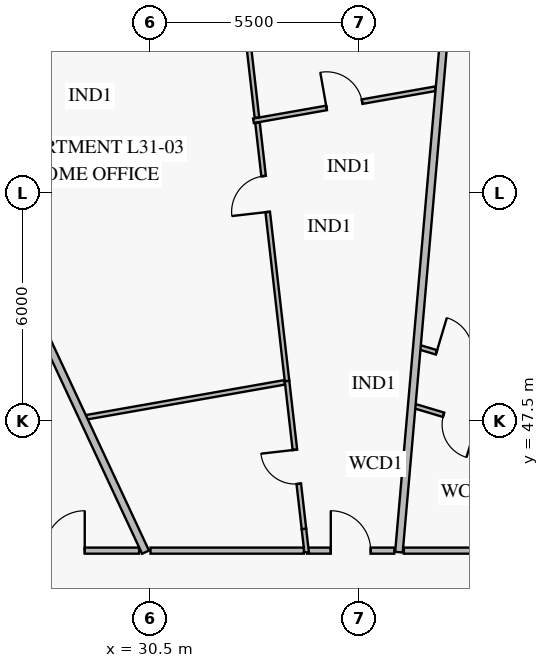
"""IFC4 building model, lengths in metres.
Left out: names, types, materials, properties, quantities, classifications, styles, units other than length and angle.
Written with IfcOpenShell. Run it as: python <this file> out.ifc"""

import sys

from ifc_helpers import new_model, si_unit, direction, frame, frame_2d, origin, place, context, subcontext, project, spatial, rectangle, extrude, element, fill, save


model = new_model("IFC4")
c1 = context("Model", 3, precision=1e-05, world=origin(), true_north=direction((0.0, 1.0)))
c2 = subcontext(c1, "Body", "Model", "MODEL_VIEW")
j1 = project(units=[si_unit("LENGTHUNIT", "METRE"), si_unit("PLANEANGLEUNIT", "RADIAN")], contexts=[c1])
p1 = place(None, origin())
s1 = spatial("IfcSite", under=j1, at=p1, CompositionType="ELEMENT")
p2 = place(p1, origin())
s2 = spatial("IfcBuilding", under=s1, at=p2, CompositionType="ELEMENT")
p3 = place(p2, frame((0.0, 0.0, 126.6)))
s3 = spatial("IfcBuildingStorey", under=s2, at=p3, CompositionType="ELEMENT", Elevation=126.6)
p4 = place(p3, frame((43.556, 46.057, 0.0), z_axis=(0.0, 0.0, 1.0), x_axis=(-0.957822082652, 0.287361893759, 0.0)))
e1 = element("IfcWall", 1, at=p4, inside=s3, PredefinedType="PARTITIONING", context=c2, shape_type="SweptSolid", body=[
    extrude(rectangle(XDim=6.396, YDim=0.12, at=frame_2d((3.198, 0.0))), origin(), (0.0, 0.0, 1.0), 2.85),
])
p5 = place(p4, frame((1.542, 0.0, 0.0)))
e2 = element("IfcOpeningElement", 2, at=p5, cuts=e1, PredefinedType="OPENING", context=c2, shape_type="SweptSolid", body=[
    extrude(rectangle(XDim=0.95, YDim=2.1, at=frame_2d((0.475, 1.05))), frame((0.0, 0.072, 0.0), z_axis=(0.0, -1.0, 0.0), x_axis=(1.0, 0.0, 0.0)), (0.0, 0.0, 1.0), 0.144),
])
p6 = place(p4, frame((4.663, 0.0, 0.0)))
e3 = element("IfcOpeningElement", 3, at=p6, cuts=e1, PredefinedType="OPENING", context=c2, shape_type="SweptSolid", body=[
    extrude(rectangle(XDim=0.9, YDim=2.1, at=frame_2d((0.45, 1.05))), frame((0.0, 0.072, 0.0), z_axis=(0.0, -1.0, 0.0), x_axis=(1.0, 0.0, 0.0)), (0.0, 0.0, 1.0), 0.144),
])
p7 = place(p3, frame((44.281, 47.426, 0.0), z_axis=(0.0, 0.0, 1.0), x_axis=(-0.957812840143, 0.287392698684, 0.0)))
e4 = element("IfcWall", 4, at=p7, inside=s3, PredefinedType="PARTITIONING", context=c2, shape_type="SweptSolid", body=[
    extrude(rectangle(XDim=6.997, YDim=0.12, at=frame_2d((3.499, 0.0))), origin(), (0.0, 0.0, 1.0), 2.85),
])
p8 = place(p7, frame((0.483, 0.0, 0.0)))
e5 = element("IfcOpeningElement", 5, at=p8, cuts=e4, PredefinedType="OPENING", context=c2, shape_type="SweptSolid", body=[
    extrude(rectangle(XDim=0.95, YDim=2.1, at=frame_2d((0.475, 1.05))), frame((0.0, 0.072, 0.0), z_axis=(0.0, -1.0, 0.0), x_axis=(1.0, 0.0, 0.0)), (0.0, 0.0, 1.0), 0.144),
])
p9 = place(p7, frame((2.182, 0.0, 0.0)))
e6 = element("IfcOpeningElement", 6, at=p9, cuts=e4, PredefinedType="OPENING", context=c2, shape_type="SweptSolid", body=[
    extrude(rectangle(XDim=0.95, YDim=2.1, at=frame_2d((0.475, 1.05))), frame((0.0, 0.072, 0.0), z_axis=(0.0, -1.0, 0.0), x_axis=(1.0, 0.0, 0.0)), (0.0, 0.0, 1.0), 0.144),
])
p10 = place(p7, frame((3.865, 0.0, 0.0)))
e7 = element("IfcOpeningElement", 7, at=p10, cuts=e4, PredefinedType="OPENING", context=c2, shape_type="SweptSolid", body=[
    extrude(rectangle(XDim=0.95, YDim=2.1, at=frame_2d((0.475, 1.05))), frame((0.0, 0.072, 0.0), z_axis=(0.0, -1.0, 0.0), x_axis=(1.0, 0.0, 0.0)), (0.0, 0.0, 1.0), 0.144),
])
p11 = place(p7, frame((5.564, 0.0, 0.0)))
e8 = element("IfcOpeningElement", 8, at=p11, cuts=e4, PredefinedType="OPENING", context=c2, shape_type="SweptSolid", body=[
    extrude(rectangle(XDim=0.95, YDim=2.1, at=frame_2d((0.475, 1.05))), frame((0.0, 0.072, 0.0), z_axis=(0.0, -1.0, 0.0), x_axis=(1.0, 0.0, 0.0)), (0.0, 0.0, 1.0), 0.144),
])
p12 = place(p3, frame((38.008, 56.234, 0.0), z_axis=(0.0, 0.0, 1.0), x_axis=(-0.984810882198, -0.173630430239, 0.0)))
e9 = element("IfcWall", 9, at=p12, inside=s3, PredefinedType="PARTITIONING", context=c2, shape_type="SweptSolid", body=[
    extrude(rectangle(XDim=4.855, YDim=0.12, at=frame_2d((2.428, 0.0))), origin(), (0.0, 0.0, 1.0), 3.55),
])
p13 = place(p12, frame((1.953, 0.0, 0.0)))
e10 = element("IfcOpeningElement", 10, at=p13, cuts=e9, PredefinedType="OPENING", context=c2, shape_type="SweptSolid", body=[
    extrude(rectangle(XDim=0.95, YDim=2.1, at=frame_2d((0.475, 1.05))), frame((0.0, 0.072, 0.0), z_axis=(0.0, -1.0, 0.0), x_axis=(1.0, 0.0, 0.0)), (0.0, 0.0, 1.0), 0.144),
])
p14 = place(p3, frame((34.554, 44.65, 0.0), z_axis=(0.0, 0.0, 1.0), x_axis=(-0.113574688957, 0.993529461077, 0.0)))
e11 = element("IfcWall", 11, at=p14, inside=s3, PredefinedType="PARTITIONING", context=c2, shape_type="SweptSolid", body=[
    extrude(rectangle(XDim=3.921, YDim=0.12, at=frame_2d((1.96, 0.0))), origin(), (0.0, 0.0, 1.0), 3.55),
])
p15 = place(p14, frame((1.197, 0.0, 0.0)))
e12 = element("IfcOpeningElement", 12, at=p15, cuts=e11, PredefinedType="OPENING", context=c2, shape_type="SweptSolid", body=[
    extrude(rectangle(XDim=0.9, YDim=2.1, at=frame_2d((0.45, 1.05))), frame((0.0, 0.072, 0.0), z_axis=(0.0, -1.0, 0.0), x_axis=(1.0, 0.0, 0.0)), (0.0, 0.0, 1.0), 0.144),
])
p16 = place(p3, frame((34.109, 48.545, 0.0), z_axis=(0.0, 0.0, 1.0), x_axis=(-0.113541557806, 0.993533247884, 0.0)))
e13 = element("IfcWall", 13, at=p16, inside=s3, PredefinedType="PARTITIONING", context=c2, shape_type="SweptSolid", body=[
    extrude(rectangle(XDim=6.84, YDim=0.12, at=frame_2d((3.42, 0.0))), origin(), (0.0, 0.0, 1.0), 3.1),
])
p17 = place(p16, frame((4.476, 0.0, 0.0)))
e14 = element("IfcOpeningElement", 14, at=p17, cuts=e13, PredefinedType="OPENING", context=c2, shape_type="SweptSolid", body=[
    extrude(rectangle(XDim=0.95, YDim=2.1, at=frame_2d((0.475, 1.05))), frame((0.0, 0.072, 0.0), z_axis=(0.0, -1.0, 0.0), x_axis=(1.0, 0.0, 0.0)), (0.0, 0.0, 1.0), 0.144),
])
p18 = place(p3, frame((33.317, 55.476, 0.0), z_axis=(0.0, 0.0, 1.0), x_axis=(-0.113518831764, 0.993535844766, 0.0)))
e15 = element("IfcWall", 15, at=p18, inside=s3, PredefinedType="PARTITIONING", context=c2, shape_type="SweptSolid", body=[
    extrude(rectangle(XDim=2.977, YDim=0.12, at=frame_2d((1.488, 0.0))), origin(), (0.0, 0.0, 1.0), 3.55),
])
p19 = place(p3, frame((32.915, 58.397, 0.0), z_axis=(0.0, 0.0, 1.0), x_axis=(-0.984808385469, -0.17364459079, 0.0)))
e16 = element("IfcWall", 16, at=p19, inside=s3, PredefinedType="PARTITIONING", context=c2, shape_type="SweptSolid", body=[
    extrude(rectangle(XDim=8.51, YDim=0.12, at=frame_2d((4.255, 0.0))), origin(), (0.0, 0.0, 1.0), 2.85),
])
p20 = place(p19, frame((3.696, 0.0, 0.0)))
e17 = element("IfcOpeningElement", 17, at=p20, cuts=e16, PredefinedType="OPENING", context=c2, shape_type="SweptSolid", body=[
    extrude(rectangle(XDim=0.95, YDim=2.1, at=frame_2d((0.475, 1.05))), frame((0.0, 0.072, 0.0), z_axis=(0.0, -1.0, 0.0), x_axis=(1.0, 0.0, 0.0)), (0.0, 0.0, 1.0), 0.144),
])
p21 = place(p3, frame((36.931, 44.08, 0.0), z_axis=(0.0, 0.0, 1.0), x_axis=(-1.0, 0.0, 0.0)))
e18 = element("IfcWall", 18, at=p21, inside=s3, PredefinedType="PARTITIONING", context=c2, shape_type="SweptSolid", body=[
    extrude(rectangle(XDim=2.291, YDim=0.16, at=frame_2d((1.146, 0.0))), origin(), (0.0, 0.0, 1.0), 3.55),
])
p22 = place(p21, frame((0.621, 0.0, 0.0)))
e19 = element("IfcOpeningElement", 19, at=p22, cuts=e18, PredefinedType="OPENING", context=c2, shape_type="SweptSolid", body=[
    extrude(rectangle(XDim=1.05, YDim=2.15, at=frame_2d((0.525, 1.075))), frame((0.0, 0.092, 0.0), z_axis=(0.0, -1.0, 0.0), x_axis=(1.0, 0.0, 0.0)), (0.0, 0.0, 1.0), 0.184),
])
p23 = place(p3, frame((30.216, 44.08, 0.0), z_axis=(0.0, 0.0, 1.0), x_axis=(-1.0, 0.0, 0.0)))
e20 = element("IfcWall", 20, at=p23, inside=s3, PredefinedType="PARTITIONING", context=c2, shape_type="SweptSolid", body=[
    extrude(rectangle(XDim=3.91, YDim=0.16, at=frame_2d((1.955, 0.0))), origin(), (0.0, 0.0, 1.0), 3.55),
])
p24 = place(p23, frame((1.43, 0.0, 0.0)))
e21 = element("IfcOpeningElement", 21, at=p24, cuts=e20, PredefinedType="OPENING", context=c2, shape_type="SweptSolid", body=[
    extrude(rectangle(XDim=1.05, YDim=2.15, at=frame_2d((0.525, 1.075))), frame((0.0, 0.092, 0.0), z_axis=(0.0, -1.0, 0.0), x_axis=(1.0, 0.0, 0.0)), (0.0, 0.0, 1.0), 0.184),
])
p25 = place(p3, frame((37.053, 44.04, 0.0), z_axis=(0.0, 0.0, 1.0), x_axis=(0.087144480826, 0.996195683318, 0.0)))
e22 = element("IfcWall", 22, at=p25, inside=s3, PredefinedType="PARTITIONING", context=c2, shape_type="SweptSolid", body=[
    extrude(rectangle(XDim=16.983, YDim=0.2, at=frame_2d((8.492, 0.0))), origin(), (0.0, 0.0, 1.0), 2.8),
])
p26 = place(p3, frame((34.625, 44.035, 0.0), z_axis=(0.0, 0.0, 1.0), x_axis=(-0.113635614935, 0.99352249447, 0.0)))
e23 = element("IfcWall", 23, at=p26, inside=s3, PredefinedType="PARTITIONING", context=c2, shape_type="SweptSolid", body=[
    extrude(rectangle(XDim=0.619, YDim=0.12, at=frame_2d((0.309, 0.0))), origin(), (0.0, 0.0, 1.0), 3.55),
])
p27 = place(p3, frame((34.045, 48.509, 0.0), z_axis=(0.0, 0.0, 1.0), x_axis=(-0.984807496737, -0.173649631067, 0.0)))
e24 = element("IfcWall", 24, at=p27, inside=s3, PredefinedType="PARTITIONING", context=c2, shape_type="SweptSolid", body=[
    extrude(rectangle(XDim=5.337, YDim=0.12, at=frame_2d((2.668, 0.0))), origin(), (0.0, 0.0, 1.0), 2.85),
])
p28 = place(p3, frame((30.386, 44.04, 0.0), z_axis=(0.0, 0.0, 1.0), x_axis=(-0.422626983595, 0.906303719918, 0.0)))
e25 = element("IfcWall", 25, at=p28, inside=s3, PredefinedType="PARTITIONING", context=c2, shape_type="SweptSolid", body=[
    extrude(rectangle(XDim=18.667, YDim=0.2, at=frame_2d((9.334, 0.0))), origin(), (0.0, 0.0, 1.0), 2.8),
])
p29 = place(p3, frame((38.945, 44.08, 0.0), z_axis=(0.0, 0.0, 1.0), x_axis=(-1.0, 0.0, 0.0)))
e26 = element("IfcWall", 26, at=p29, inside=s3, PredefinedType="PARTITIONING", context=c2, shape_type="SweptSolid", body=[
    extrude(rectangle(XDim=1.761, YDim=0.16, at=frame_2d((0.881, 0.0))), origin(), (0.0, 0.0, 1.0), 3.55),
])
p30 = place(p3, frame((34.551, 44.08, 0.0), z_axis=(0.0, 0.0, 1.0), x_axis=(-1.0, 0.0, 0.0)))
e27 = element("IfcWall", 27, at=p30, inside=s3, PredefinedType="PARTITIONING", context=c2, shape_type="SweptSolid", body=[
    extrude(rectangle(XDim=4.034, YDim=0.16, at=frame_2d((2.017, 0.0))), origin(), (0.0, 0.0, 1.0), 2.85),
])
p31 = place(p6, origin())
e28 = element("IfcDoor", 28, at=p31, inside=s3, OperationType="SINGLE_SWING_LEFT", PredefinedType="DOOR", context=c2, shape_type="SweptSolid", body=[
    extrude(rectangle(XDim=0.9, YDim=2.1, at=frame_2d((0.45, 1.05))), frame((0.0, 0.025, 0.0), z_axis=(0.0, -1.0, 0.0), x_axis=(1.0, 0.0, 0.0)), (0.0, 0.0, 1.0), 0.05),
])
fill(e3, e28)
p32 = place(p11, frame((0.95, 0.0, 0.0), z_axis=(0.0, 0.0, 1.0), x_axis=(-1.0, 0.0, 0.0)))
e29 = element("IfcDoor", 29, at=p32, inside=s3, OperationType="SINGLE_SWING_LEFT", PredefinedType="DOOR", context=c2, shape_type="SweptSolid", body=[
    extrude(rectangle(XDim=0.95, YDim=2.1, at=frame_2d((0.475, 1.05))), frame((0.0, 0.025, 0.0), z_axis=(0.0, -1.0, 0.0), x_axis=(1.0, 0.0, 0.0)), (0.0, 0.0, 1.0), 0.05),
])
fill(e8, e29)
p33 = place(p13, frame((0.95, 0.0, 0.0), z_axis=(0.0, 0.0, 1.0), x_axis=(-1.0, 0.0, 0.0)))
e30 = element("IfcDoor", 30, at=p33, inside=s3, OperationType="SINGLE_SWING_LEFT", PredefinedType="DOOR", context=c2, shape_type="SweptSolid", body=[
    extrude(rectangle(XDim=0.95, YDim=2.1, at=frame_2d((0.475, 1.05))), frame((0.0, 0.025, 0.0), z_axis=(0.0, -1.0, 0.0), x_axis=(1.0, 0.0, 0.0)), (0.0, 0.0, 1.0), 0.05),
])
fill(e10, e30)
p34 = place(p15, origin())
e31 = element("IfcDoor", 31, at=p34, inside=s3, OperationType="SINGLE_SWING_RIGHT", PredefinedType="DOOR", context=c2, shape_type="SweptSolid", body=[
    extrude(rectangle(XDim=0.9, YDim=2.1, at=frame_2d((0.45, 1.05))), frame((0.0, 0.025, 0.0), z_axis=(0.0, -1.0, 0.0), x_axis=(1.0, 0.0, 0.0)), (0.0, 0.0, 1.0), 0.05),
])
fill(e12, e31)
p35 = place(p17, origin())
e32 = element("IfcDoor", 32, at=p35, inside=s3, OperationType="SINGLE_SWING_LEFT", PredefinedType="DOOR", context=c2, shape_type="SweptSolid", body=[
    extrude(rectangle(XDim=0.95, YDim=2.1, at=frame_2d((0.475, 1.05))), frame((0.0, 0.025, 0.0), z_axis=(0.0, -1.0, 0.0), x_axis=(1.0, 0.0, 0.0)), (0.0, 0.0, 1.0), 0.05),
])
fill(e14, e32)
p36 = place(p22, frame((1.05, 0.0, 0.0), z_axis=(0.0, 0.0, 1.0), x_axis=(-1.0, 0.0, 0.0)))
e33 = element("IfcDoor", 33, at=p36, inside=s3, OperationType="SINGLE_SWING_LEFT", PredefinedType="DOOR", context=c2, shape_type="SweptSolid", body=[
    extrude(rectangle(XDim=1.05, YDim=2.15, at=frame_2d((0.525, 1.075))), frame((0.0, 0.025, 0.0), z_axis=(0.0, -1.0, 0.0), x_axis=(1.0, 0.0, 0.0)), (0.0, 0.0, 1.0), 0.05),
])
fill(e19, e33)
p37 = place(p24, frame((1.05, 0.0, 0.0), z_axis=(0.0, 0.0, 1.0), x_axis=(-1.0, 0.0, 0.0)))
e34 = element("IfcDoor", 34, at=p37, inside=s3, OperationType="SINGLE_SWING_RIGHT", PredefinedType="DOOR", context=c2, shape_type="SweptSolid", body=[
    extrude(rectangle(XDim=1.05, YDim=2.15, at=frame_2d((0.525, 1.075))), frame((0.0, 0.025, 0.0), z_axis=(0.0, -1.0, 0.0), x_axis=(1.0, 0.0, 0.0)), (0.0, 0.0, 1.0), 0.05),
])
fill(e21, e34)
save(model, sys.argv[1])
